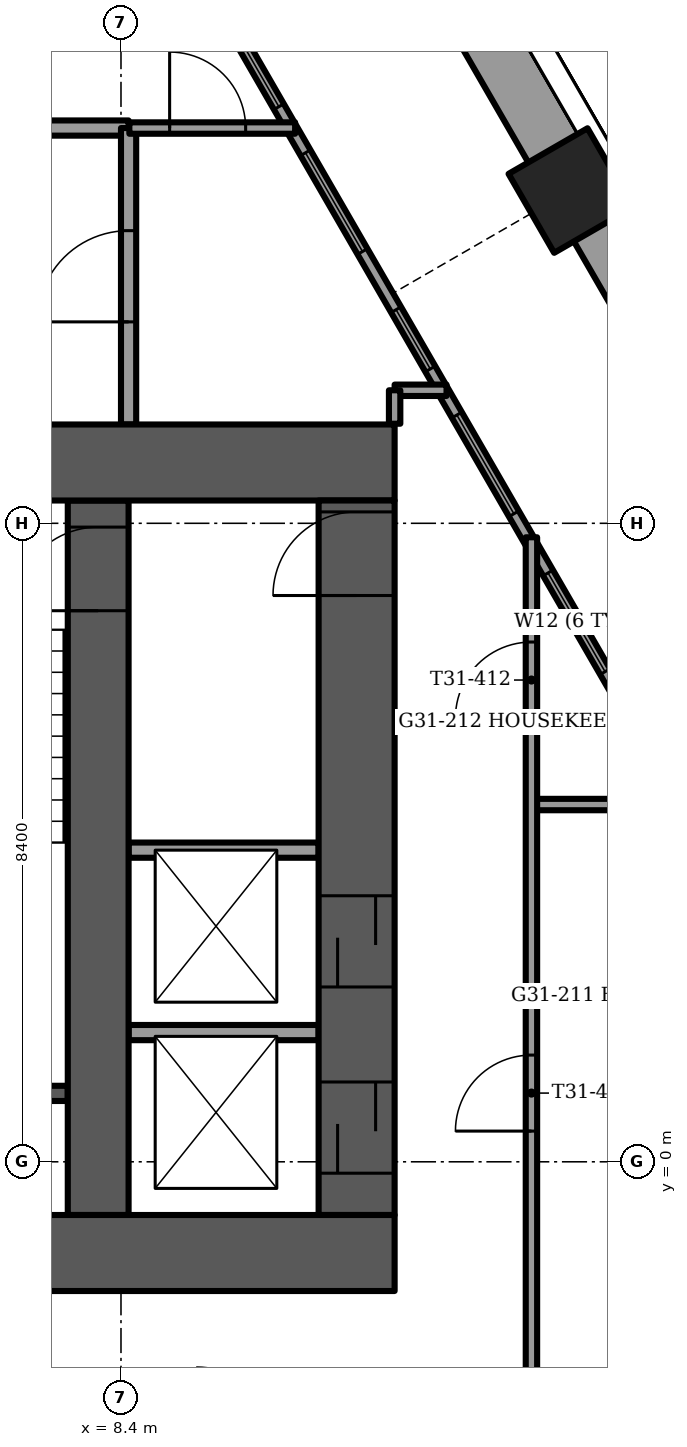
"""IFC4 building model, lengths in metres.
Left out: names, types, materials, properties, quantities, classifications, styles, units other than length and angle.
Written with IfcOpenShell. Run it as: python <this file> out.ifc"""

import sys

from ifc_helpers import new_model, si_unit, direction, frame, frame_2d, origin, origin_2d, place, context, subcontext, project, spatial, rectangle, extrude, element, fill, save


model = new_model("IFC4")
c1 = context("Model", 3, precision=1e-05, world=origin(), true_north=direction((0.0, 1.0)))
c2 = subcontext(c1, "Body", "Model", "MODEL_VIEW")
j1 = project(units=[si_unit("LENGTHUNIT", "METRE"), si_unit("PLANEANGLEUNIT", "RADIAN")], contexts=[c1])
p1 = place(None, origin())
s1 = spatial("IfcSite", under=j1, at=p1, CompositionType="ELEMENT")
p2 = place(p1, origin())
s2 = spatial("IfcBuilding", under=s1, at=p2, CompositionType="ELEMENT")
p3 = place(p2, frame((0.0, 0.0, 127.25)))
s3 = spatial("IfcBuildingStorey", under=s2, at=p3, CompositionType="ELEMENT", Elevation=127.25)
p4 = place(p3, frame((14.318, 12.778, -1.2), z_axis=(0.0, 0.0, 1.0), x_axis=(0.5, -0.866025403784, 0.0)))
e1 = element("IfcColumn", 1, at=p4, inside=s3, PredefinedType="COLUMN", context=c2, shape_type="SweptSolid", body=[
    extrude(rectangle(XDim=1.2, YDim=1.2, at=origin_2d()), origin(), (0.0, 0.0, 1.0), 3.75),
])
p5 = place(p3, frame((-12.0, -1.2, -0.3), z_axis=(0.0, 0.0, 1.0), x_axis=(1.0, 0.0, 0.0)))
e2 = element("IfcWall", 2, at=p5, inside=s3, PredefinedType="SHEAR", context=c2, shape_type="SweptSolid", body=[
    extrude(rectangle(XDim=24.0, YDim=1.0, at=frame_2d((12.0, 0.0))), origin(), (0.0, 0.0, 1.0), 3.75),
])
p6 = place(p5, frame((11.2, 0.0, 0.0)))
e3 = element("IfcOpeningElement", 3, at=p6, cuts=e2, PredefinedType="OPENING", context=c2, shape_type="SweptSolid", body=[
    extrude(rectangle(XDim=1.6, YDim=2.1, at=frame_2d((0.8, 1.05))), frame((0.0, 0.5, 0.0), z_axis=(0.0, -1.0, 0.0), x_axis=(1.0, 0.0, 0.0)), (0.0, 0.0, 1.0), 1.0),
])
p7 = place(p3, frame((-12.0, 9.2, -0.3), z_axis=(0.0, 0.0, 1.0), x_axis=(1.0, 0.0, 0.0)))
e4 = element("IfcWall", 4, at=p7, inside=s3, PredefinedType="SHEAR", context=c2, shape_type="SweptSolid", body=[
    extrude(rectangle(XDim=24.0, YDim=1.0, at=frame_2d((12.0, 0.0))), origin(), (0.0, 0.0, 1.0), 3.75),
])
p8 = place(p7, frame((11.2, 0.0, 0.0)))
e5 = element("IfcOpeningElement", 5, at=p8, cuts=e4, PredefinedType="OPENING", context=c2, shape_type="SweptSolid", body=[
    extrude(rectangle(XDim=1.6, YDim=2.1, at=frame_2d((0.8, 1.05))), frame((0.0, 0.5, 0.0), z_axis=(0.0, -1.0, 0.0), x_axis=(1.0, 0.0, 0.0)), (0.0, 0.0, 1.0), 1.0),
])
p9 = place(p7, frame((5.25, 0.0, 0.0)))
e6 = element("IfcOpeningElement", 6, at=p9, cuts=e4, PredefinedType="OPENING", context=c2, shape_type="SweptSolid", body=[
    extrude(rectangle(XDim=1.1, YDim=2.1, at=frame_2d((0.55, 1.05))), frame((0.0, 0.5, 0.0), z_axis=(0.0, -1.0, 0.0), x_axis=(1.0, 0.0, 0.0)), (0.0, 0.0, 1.0), 1.0),
])
p10 = place(p7, frame((17.65, 0.0, 0.0)))
e7 = element("IfcOpeningElement", 7, at=p10, cuts=e4, PredefinedType="OPENING", context=c2, shape_type="SweptSolid", body=[
    extrude(rectangle(XDim=1.1, YDim=2.1, at=frame_2d((0.55, 1.05))), frame((0.0, 0.5, 0.0), z_axis=(0.0, -1.0, 0.0), x_axis=(1.0, 0.0, 0.0)), (0.0, 0.0, 1.0), 1.0),
])
p11 = place(p3, frame((8.1, -0.7, -0.3), z_axis=(0.0, 0.0, 1.0), x_axis=(0.0, 1.0, 0.0)))
e8 = element("IfcWall", 8, at=p11, inside=s3, PredefinedType="SHEAR", context=c2, shape_type="SweptSolid", body=[
    extrude(rectangle(XDim=9.4, YDim=0.8, at=frame_2d((4.7, 0.0))), origin(), (0.0, 0.0, 1.0), 3.75),
])
p12 = place(p11, frame((7.95, 0.0, 0.0)))
e9 = element("IfcOpeningElement", 9, at=p12, cuts=e8, PredefinedType="OPENING", context=c2, shape_type="SweptSolid", body=[
    extrude(rectangle(XDim=1.1, YDim=2.1, at=frame_2d((0.55, 1.05))), frame((0.0, 0.4, 0.0), z_axis=(0.0, -1.0, 0.0), x_axis=(1.0, 0.0, 0.0)), (0.0, 0.0, 1.0), 0.8),
])
p13 = place(p3, frame((11.5, -0.7, -0.3), z_axis=(0.0, 0.0, 1.0), x_axis=(0.0, 1.0, 0.0)))
e10 = element("IfcWall", 10, at=p13, inside=s3, PredefinedType="SHEAR", context=c2, shape_type="SweptSolid", body=[
    extrude(rectangle(XDim=9.4, YDim=1.0, at=frame_2d((4.7, 0.0))), origin(), (0.0, 0.0, 1.0), 3.75),
])
p14 = place(p13, frame((8.15, 0.0, 0.0)))
e11 = element("IfcOpeningElement", 11, at=p14, cuts=e10, PredefinedType="OPENING", context=c2, shape_type="SweptSolid", body=[
    extrude(rectangle(XDim=1.1, YDim=2.1, at=frame_2d((0.55, 1.05))), frame((0.0, 0.5, 0.0), z_axis=(0.0, -1.0, 0.0), x_axis=(1.0, 0.0, 0.0)), (0.0, 0.0, 1.0), 1.0),
])
p15 = place(p13, frame((0.55, 0.0, 0.0)))
e12 = element("IfcOpeningElement", 12, at=p15, cuts=e10, PredefinedType="OPENING", context=c2, shape_type="SweptSolid", body=[
    extrude(rectangle(XDim=1.2, YDim=2.1, at=frame_2d((0.6, 1.05))), frame((0.0, 0.5, 0.0), z_axis=(0.0, -1.0, 0.0), x_axis=(1.0, 0.0, 0.0)), (0.0, 0.0, 1.0), 1.0),
])
p16 = place(p13, frame((3.0, 0.0, 0.0)))
e13 = element("IfcOpeningElement", 13, at=p16, cuts=e10, PredefinedType="OPENING", context=c2, shape_type="SweptSolid", body=[
    extrude(rectangle(XDim=1.2, YDim=2.1, at=frame_2d((0.6, 1.05))), frame((0.0, 0.5, 0.0), z_axis=(0.0, -1.0, 0.0), x_axis=(1.0, 0.0, 0.0)), (0.0, 0.0, 1.0), 1.0),
])
p17 = place(p3, frame((18.07, 6.58, 0.0), z_axis=(0.0, 0.0, 1.0), x_axis=(-0.499999023957, 0.866025967302, 0.0)))
e14 = element("IfcWall", 14, at=p17, inside=s3, PredefinedType="PARAPET", context=c2, shape_type="SweptSolid", body=[
    extrude(rectangle(XDim=6.673, YDim=0.9, at=frame_2d((3.337, 0.0))), origin(), (0.0, 0.0, 1.0), 1.1),
])
p18 = place(p3, frame((14.163, 13.346, 0.0), z_axis=(0.0, 0.0, 1.0), x_axis=(-0.500001814021, 0.866024356456, 0.0)))
e15 = element("IfcWall", 15, at=p18, inside=s3, PredefinedType="PARAPET", context=c2, shape_type="SweptSolid", body=[
    extrude(rectangle(XDim=6.859, YDim=0.9, at=frame_2d((3.429, 0.0))), origin(), (0.0, 0.0, 1.0), 1.1),
])
p19 = place(p3, frame((10.605, -15.481, 0.0), z_axis=(0.0, 0.0, 1.0), x_axis=(0.500010582961, 0.866019293623, 0.0)))
e16 = element("IfcWall", 16, at=p19, inside=s3, PredefinedType="SOLIDWALL", context=c2, shape_type="SweptSolid", body=[
    extrude(rectangle(XDim=16.21, YDim=0.15, at=frame_2d((8.105, 0.0))), origin(), (0.0, 0.0, 1.0), 3.45),
])
p20 = place(p19, frame((2.105, 0.0, 0.15)))
e17 = element("IfcOpeningElement", 17, at=p20, cuts=e16, PredefinedType="OPENING", context=c2, shape_type="SweptSolid", body=[
    extrude(rectangle(XDim=1.7, YDim=2.85, at=frame_2d((0.85, 1.425))), frame((0.0, 0.075, 0.0), z_axis=(0.0, -1.0, 0.0), x_axis=(1.0, 0.0, 0.0)), (0.0, 0.0, 1.0), 0.15),
])
p21 = place(p19, frame((4.205, 0.0, 0.0)))
e18 = element("IfcOpeningElement", 18, at=p21, cuts=e16, PredefinedType="OPENING", context=c2, shape_type="SweptSolid", body=[
    extrude(rectangle(XDim=1.5, YDim=2.4, at=frame_2d((0.75, 1.2))), frame((0.0, 0.075, 0.0), z_axis=(0.0, -1.0, 0.0), x_axis=(1.0, 0.0, 0.0)), (0.0, 0.0, 1.0), 0.15),
])
p22 = place(p19, frame((6.305, 0.0, 0.15)))
e19 = element("IfcOpeningElement", 19, at=p22, cuts=e16, PredefinedType="OPENING", context=c2, shape_type="SweptSolid", body=[
    extrude(rectangle(XDim=1.7, YDim=2.85, at=frame_2d((0.85, 1.425))), frame((0.0, 0.075, 0.0), z_axis=(0.0, -1.0, 0.0), x_axis=(1.0, 0.0, 0.0)), (0.0, 0.0, 1.0), 0.15),
])
p23 = place(p19, frame((8.228, 0.0, 0.0)))
e20 = element("IfcOpeningElement", 20, at=p23, cuts=e16, PredefinedType="OPENING", context=c2, shape_type="SweptSolid", body=[
    extrude(rectangle(XDim=1.5, YDim=2.4, at=frame_2d((0.75, 1.2))), frame((0.0, 0.075, 0.0), z_axis=(0.0, -1.0, 0.0), x_axis=(1.0, 0.0, 0.0)), (0.0, 0.0, 1.0), 0.15),
])
p24 = place(p19, frame((11.78, 0.0, 0.15)))
e21 = element("IfcOpeningElement", 21, at=p24, cuts=e16, PredefinedType="OPENING", context=c2, shape_type="SweptSolid", body=[
    extrude(rectangle(XDim=1.5, YDim=2.85, at=frame_2d((0.75, 1.425))), frame((0.0, 0.075, 0.0), z_axis=(0.0, -1.0, 0.0), x_axis=(1.0, 0.0, 0.0)), (0.0, 0.0, 1.0), 0.15),
])
p25 = place(p19, frame((0.402, 0.0, 0.15)))
e22 = element("IfcOpeningElement", 22, at=p25, cuts=e16, PredefinedType="OPENING", context=c2, shape_type="SweptSolid", body=[
    extrude(rectangle(XDim=0.9, YDim=2.73, at=frame_2d((0.45, 1.365))), frame((0.0, 0.075, 0.0), z_axis=(0.0, -1.0, 0.0), x_axis=(1.0, 0.0, 0.0)), (0.0, 0.0, 1.0), 0.15),
])
p26 = place(p19, frame((14.907, 0.0, 0.15)))
e23 = element("IfcOpeningElement", 23, at=p26, cuts=e16, PredefinedType="OPENING", context=c2, shape_type="SweptSolid", body=[
    extrude(rectangle(XDim=0.9, YDim=2.73, at=frame_2d((0.45, 1.365))), frame((0.0, 0.075, 0.0), z_axis=(0.0, -1.0, 0.0), x_axis=(1.0, 0.0, 0.0)), (0.0, 0.0, 1.0), 0.15),
])
p27 = place(p3, frame((18.71, -0.378, 0.0), z_axis=(0.0, 0.0, 1.0), x_axis=(-0.500001219746, 0.866024699562, 0.0)))
e24 = element("IfcWall", 24, at=p27, inside=s3, PredefinedType="SOLIDWALL", context=c2, shape_type="SweptSolid", body=[
    extrude(rectangle(XDim=22.137, YDim=0.15, at=frame_2d((11.068, 0.0))), origin(), (0.0, 0.0, 1.0), 3.45),
])
p28 = place(p27, frame((1.583, 0.0, 0.15)))
e25 = element("IfcOpeningElement", 25, at=p28, cuts=e24, PredefinedType="OPENING", context=c2, shape_type="SweptSolid", body=[
    extrude(rectangle(XDim=1.7, YDim=2.85, at=frame_2d((0.85, 1.425))), frame((0.0, 0.075, 0.0), z_axis=(0.0, -1.0, 0.0), x_axis=(1.0, 0.0, 0.0)), (0.0, 0.0, 1.0), 0.15),
])
p29 = place(p27, frame((3.438, 0.0, 0.0)))
e26 = element("IfcOpeningElement", 26, at=p29, cuts=e24, PredefinedType="OPENING", context=c2, shape_type="SweptSolid", body=[
    extrude(rectangle(XDim=1.5, YDim=2.4, at=frame_2d((0.75, 1.2))), frame((0.0, 0.075, 0.0), z_axis=(0.0, -1.0, 0.0), x_axis=(1.0, 0.0, 0.0)), (0.0, 0.0, 1.0), 0.15),
])
p30 = place(p27, frame((6.188, 0.0, 0.15)))
e27 = element("IfcOpeningElement", 27, at=p30, cuts=e24, PredefinedType="OPENING", context=c2, shape_type="SweptSolid", body=[
    extrude(rectangle(XDim=0.9, YDim=2.85, at=frame_2d((0.45, 1.425))), frame((0.0, 0.075, 0.0), z_axis=(0.0, -1.0, 0.0), x_axis=(1.0, 0.0, 0.0)), (0.0, 0.0, 1.0), 0.15),
])
p31 = place(p27, frame((7.883, 0.0, 0.15)))
e28 = element("IfcOpeningElement", 28, at=p31, cuts=e24, PredefinedType="OPENING", context=c2, shape_type="SweptSolid", body=[
    extrude(rectangle(XDim=1.5, YDim=2.85, at=frame_2d((0.75, 1.425))), frame((0.0, 0.075, 0.0), z_axis=(0.0, -1.0, 0.0), x_axis=(1.0, 0.0, 0.0)), (0.0, 0.0, 1.0), 0.15),
])
p32 = place(p27, frame((12.481, 0.0, 0.15)))
e29 = element("IfcOpeningElement", 29, at=p32, cuts=e24, PredefinedType="OPENING", context=c2, shape_type="SweptSolid", body=[
    extrude(rectangle(XDim=0.9, YDim=2.85, at=frame_2d((0.45, 1.425))), frame((0.0, 0.075, 0.0), z_axis=(0.0, -1.0, 0.0), x_axis=(1.0, 0.0, 0.0)), (0.0, 0.0, 1.0), 0.15),
])
p33 = place(p27, frame((10.281, 0.0, 0.15)))
e30 = element("IfcOpeningElement", 30, at=p33, cuts=e24, PredefinedType="OPENING", context=c2, shape_type="SweptSolid", body=[
    extrude(rectangle(XDim=1.5, YDim=2.85, at=frame_2d((0.75, 1.425))), frame((0.0, 0.075, 0.0), z_axis=(0.0, -1.0, 0.0), x_axis=(1.0, 0.0, 0.0)), (0.0, 0.0, 1.0), 0.15),
])
p34 = place(p27, frame((16.465, 0.0, 0.15)))
e31 = element("IfcOpeningElement", 31, at=p34, cuts=e24, PredefinedType="OPENING", context=c2, shape_type="SweptSolid", body=[
    extrude(rectangle(XDim=0.9, YDim=2.85, at=frame_2d((0.45, 1.425))), frame((0.0, 0.075, 0.0), z_axis=(0.0, -1.0, 0.0), x_axis=(1.0, 0.0, 0.0)), (0.0, 0.0, 1.0), 0.15),
])
p35 = place(p27, frame((14.265, 0.0, 0.15)))
e32 = element("IfcOpeningElement", 32, at=p35, cuts=e24, PredefinedType="OPENING", context=c2, shape_type="SweptSolid", body=[
    extrude(rectangle(XDim=1.5, YDim=2.85, at=frame_2d((0.75, 1.425))), frame((0.0, 0.075, 0.0), z_axis=(0.0, -1.0, 0.0), x_axis=(1.0, 0.0, 0.0)), (0.0, 0.0, 1.0), 0.15),
])
p36 = place(p27, frame((19.415, 0.0, 0.15)))
e33 = element("IfcOpeningElement", 33, at=p36, cuts=e24, PredefinedType="OPENING", context=c2, shape_type="SweptSolid", body=[
    extrude(rectangle(XDim=1.7, YDim=2.73, at=frame_2d((0.85, 1.365))), frame((0.0, 0.075, 0.0), z_axis=(0.0, -1.0, 0.0), x_axis=(1.0, 0.0, 0.0)), (0.0, 0.0, 1.0), 0.15),
])
p37 = place(p3, frame((4.45, 0.9, -0.3), z_axis=(0.0, 0.0, 1.0), x_axis=(1.0, 0.0, 0.0)))
e34 = element("IfcWall", 34, at=p37, inside=s3, PredefinedType="SOLIDWALL", context=c2, shape_type="SweptSolid", body=[
    extrude(rectangle(XDim=3.25, YDim=0.2, at=frame_2d((1.625, 0.0))), origin(), (0.0, 0.0, 1.0), 3.75),
])
p38 = place(p3, frame((-8.5, 13.6, 0.0), z_axis=(0.0, 0.0, 1.0), x_axis=(1.0, 0.0, 0.0)))
e35 = element("IfcWall", 35, at=p38, inside=s3, PredefinedType="PARTITIONING", context=c2, shape_type="SweptSolid", body=[
    extrude(rectangle(XDim=17.0, YDim=0.2, at=frame_2d((8.5, 0.0))), origin(), (0.0, 0.0, 1.0), 3.45),
])
p39 = place(p38, frame((8.0, 0.0, 0.0)))
e36 = element("IfcOpeningElement", 36, at=p39, cuts=e35, PredefinedType="OPENING", context=c2, shape_type="SweptSolid", body=[
    extrude(rectangle(XDim=1.0, YDim=2.1, at=frame_2d((0.5, 1.05))), frame((0.0, 0.1, 0.0), z_axis=(0.0, -1.0, 0.0), x_axis=(1.0, 0.0, 0.0)), (0.0, 0.0, 1.0), 0.2),
])
p40 = place(p3, frame((8.5, 9.7, 0.0), z_axis=(0.0, 0.0, 1.0), x_axis=(0.0, 1.0, 0.0)))
e37 = element("IfcWall", 37, at=p40, inside=s3, PredefinedType="PARTITIONING", context=c2, shape_type="SweptSolid", body=[
    extrude(rectangle(XDim=3.9, YDim=0.2, at=frame_2d((1.95, 0.0))), origin(), (0.0, 0.0, 1.0), 3.45),
])
p41 = place(p40, frame((1.35, 0.0, 0.0)))
e38 = element("IfcOpeningElement", 38, at=p41, cuts=e37, PredefinedType="OPENING", context=c2, shape_type="SweptSolid", body=[
    extrude(rectangle(XDim=1.2, YDim=2.1, at=frame_2d((0.6, 1.05))), frame((0.0, 0.1, 0.0), z_axis=(0.0, -1.0, 0.0), x_axis=(1.0, 0.0, 0.0)), (0.0, 0.0, 1.0), 0.2),
])
for number, where, z_axis, x_axis in (
    (39, (8.5, 1.7, 0.0), (0.0, 0.0, 1.0), (1.0, 0.0, 0.0)),
    (40, (8.5, 4.1, 0.0), (0.0, 0.0, 1.0), (1.0, 0.0, 0.0)),
):
    element("IfcWall", number, at=place(p3, frame(where, z_axis=z_axis, x_axis=x_axis)), inside=s3, PredefinedType="PARTITIONING", context=c2, shape_type="SweptSolid", body=[
        extrude(rectangle(XDim=2.5, YDim=0.2, at=frame_2d((1.25, 0.0))), origin(), (0.0, 0.0, 1.0), 3.45),
    ])
p42 = place(p3, frame((13.8, 4.7, 0.0), z_axis=(0.0, 0.0, 1.0), x_axis=(1.0, 0.0, 0.0)))
e41 = element("IfcWall", 41, at=p42, inside=s3, PredefinedType="PARTITIONING", context=c2, shape_type="SweptSolid", body=[
    extrude(rectangle(XDim=2.03, YDim=0.15, at=frame_2d((1.015, 0.0))), origin(), (0.0, 0.0, 1.0), 3.45),
])
p43 = place(p3, frame((12.0, 10.15, 0.0), z_axis=(0.0, 0.0, 1.0), x_axis=(1.0, 0.0, 0.0)))
e42 = element("IfcWall", 42, at=p43, inside=s3, PredefinedType="PARTITIONING", context=c2, shape_type="SweptSolid", body=[
    extrude(rectangle(XDim=0.683, YDim=0.15, at=frame_2d((0.342, 0.0))), origin(), (0.0, 0.0, 1.0), 3.45),
])
p44 = place(p3, frame((8.51, 13.6, 0.0), z_axis=(0.0, 0.0, 1.0), x_axis=(1.0, 0.0, 0.0)))
e43 = element("IfcWall", 43, at=p44, inside=s3, PredefinedType="PARTITIONING", context=c2, shape_type="SweptSolid", body=[
    extrude(rectangle(XDim=2.181, YDim=0.15, at=frame_2d((1.09, 0.0))), origin(), (0.0, 0.0, 1.0), 3.45),
])
p45 = place(p44, frame((0.53, 0.0, 0.0)))
e44 = element("IfcOpeningElement", 44, at=p45, cuts=e43, PredefinedType="OPENING", context=c2, shape_type="SweptSolid", body=[
    extrude(rectangle(XDim=1.0, YDim=2.1, at=frame_2d((0.5, 1.05))), frame((0.0, 0.075, 0.0), z_axis=(0.0, -1.0, 0.0), x_axis=(1.0, 0.0, 0.0)), (0.0, 0.0, 1.0), 0.15),
])
p46 = place(p3, frame((13.8, -3.7, 0.0), z_axis=(0.0, 0.0, 1.0), x_axis=(0.0, 1.0, 0.0)))
e45 = element("IfcWall", 45, at=p46, inside=s3, PredefinedType="PARTITIONING", context=c2, shape_type="SweptSolid", body=[
    extrude(rectangle(XDim=11.916, YDim=0.15, at=frame_2d((5.958, 0.0))), origin(), (0.0, 0.0, 1.0), 3.45),
])
p47 = place(p46, frame((4.104, 0.0, 0.0)))
e46 = element("IfcOpeningElement", 46, at=p47, cuts=e45, PredefinedType="OPENING", context=c2, shape_type="SweptSolid", body=[
    extrude(rectangle(XDim=1.0, YDim=2.1, at=frame_2d((0.5, 1.05))), frame((0.0, 0.075, 0.0), z_axis=(0.0, -1.0, 0.0), x_axis=(1.0, 0.0, 0.0)), (0.0, 0.0, 1.0), 0.15),
])
p48 = place(p46, frame((9.538, 0.0, 0.0)))
e47 = element("IfcOpeningElement", 47, at=p48, cuts=e45, PredefinedType="OPENING", context=c2, shape_type="SweptSolid", body=[
    extrude(rectangle(XDim=1.0, YDim=2.1, at=frame_2d((0.5, 1.05))), frame((0.0, 0.075, 0.0), z_axis=(0.0, -1.0, 0.0), x_axis=(1.0, 0.0, 0.0)), (0.0, 0.0, 1.0), 0.15),
])
p49 = place(p3, frame((12.0, 9.71, 0.0), z_axis=(0.0, 0.0, 1.0), x_axis=(0.0, 1.0, 0.0)))
e48 = element("IfcWall", 48, at=p49, inside=s3, PredefinedType="PARTITIONING", context=c2, shape_type="SweptSolid", body=[
    extrude(rectangle(XDim=0.44, YDim=0.15, at=frame_2d((0.22, 0.0))), origin(), (0.0, 0.0, 1.0), 3.45),
])
p50 = place(p31, origin())
e49 = element("IfcWindow", 49, at=p50, inside=s3, PartitioningType="SINGLE_PANEL", PredefinedType="WINDOW", context=c2, shape_type="SweptSolid", body=[
    extrude(rectangle(XDim=1.5, YDim=2.85, at=frame_2d((0.75, 1.425))), frame((0.0, 0.03, 0.0), z_axis=(0.0, -1.0, 0.0), x_axis=(1.0, 0.0, 0.0)), (0.0, 0.0, 1.0), 0.06),
])
fill(e28, e49)
p51 = place(p32, origin())
e50 = element("IfcWindow", 50, at=p51, inside=s3, PartitioningType="SINGLE_PANEL", PredefinedType="WINDOW", context=c2, shape_type="SweptSolid", body=[
    extrude(rectangle(XDim=0.9, YDim=2.85, at=frame_2d((0.45, 1.425))), frame((0.0, 0.03, 0.0), z_axis=(0.0, -1.0, 0.0), x_axis=(1.0, 0.0, 0.0)), (0.0, 0.0, 1.0), 0.06),
])
fill(e29, e50)
p52 = place(p33, origin())
e51 = element("IfcWindow", 51, at=p52, inside=s3, PartitioningType="SINGLE_PANEL", PredefinedType="WINDOW", context=c2, shape_type="SweptSolid", body=[
    extrude(rectangle(XDim=1.5, YDim=2.85, at=frame_2d((0.75, 1.425))), frame((0.0, 0.03, 0.0), z_axis=(0.0, -1.0, 0.0), x_axis=(1.0, 0.0, 0.0)), (0.0, 0.0, 1.0), 0.06),
])
fill(e30, e51)
p53 = place(p34, origin())
e52 = element("IfcWindow", 52, at=p53, inside=s3, PartitioningType="SINGLE_PANEL", PredefinedType="WINDOW", context=c2, shape_type="SweptSolid", body=[
    extrude(rectangle(XDim=0.9, YDim=2.85, at=frame_2d((0.45, 1.425))), frame((0.0, 0.03, 0.0), z_axis=(0.0, -1.0, 0.0), x_axis=(1.0, 0.0, 0.0)), (0.0, 0.0, 1.0), 0.06),
])
fill(e31, e52)
p54 = place(p35, origin())
e53 = element("IfcWindow", 53, at=p54, inside=s3, PartitioningType="SINGLE_PANEL", PredefinedType="WINDOW", context=c2, shape_type="SweptSolid", body=[
    extrude(rectangle(XDim=1.5, YDim=2.85, at=frame_2d((0.75, 1.425))), frame((0.0, 0.03, 0.0), z_axis=(0.0, -1.0, 0.0), x_axis=(1.0, 0.0, 0.0)), (0.0, 0.0, 1.0), 0.06),
])
fill(e32, e53)
p55 = place(p12, origin())
e54 = element("IfcDoor", 54, at=p55, inside=s3, OperationType="SINGLE_SWING_LEFT", PredefinedType="DOOR", context=c2, shape_type="SweptSolid", body=[
    extrude(rectangle(XDim=1.1, YDim=2.1, at=frame_2d((0.55, 1.05))), frame((0.0, 0.025, 0.0), z_axis=(0.0, -1.0, 0.0), x_axis=(1.0, 0.0, 0.0)), (0.0, 0.0, 1.0), 0.05),
])
fill(e9, e54)
p56 = place(p41, origin())
e55 = element("IfcDoor", 55, at=p56, inside=s3, OperationType="SINGLE_SWING_LEFT", PredefinedType="DOOR", context=c2, shape_type="SweptSolid", body=[
    extrude(rectangle(XDim=1.2, YDim=2.1, at=frame_2d((0.6, 1.05))), frame((0.0, 0.025, 0.0), z_axis=(0.0, -1.0, 0.0), x_axis=(1.0, 0.0, 0.0)), (0.0, 0.0, 1.0), 0.05),
])
fill(e38, e55)
p57 = place(p14, origin())
e56 = element("IfcDoor", 56, at=p57, inside=s3, OperationType="SINGLE_SWING_RIGHT", PredefinedType="DOOR", context=c2, shape_type="SweptSolid", body=[
    extrude(rectangle(XDim=1.1, YDim=2.1, at=frame_2d((0.55, 1.05))), frame((0.0, 0.025, 0.0), z_axis=(0.0, -1.0, 0.0), x_axis=(1.0, 0.0, 0.0)), (0.0, 0.0, 1.0), 0.05),
])
fill(e11, e56)
p58 = place(p15, origin())
e57 = element("IfcDoor", 57, at=p58, inside=s3, OperationType="SLIDING_TO_LEFT", PredefinedType="DOOR", context=c2, shape_type="SweptSolid", body=[
    extrude(rectangle(XDim=1.2, YDim=2.1, at=frame_2d((0.6, 1.05))), frame((0.0, 0.025, 0.0), z_axis=(0.0, -1.0, 0.0), x_axis=(1.0, 0.0, 0.0)), (0.0, 0.0, 1.0), 0.05),
])
fill(e12, e57)
p59 = place(p16, origin())
e58 = element("IfcDoor", 58, at=p59, inside=s3, OperationType="SLIDING_TO_LEFT", PredefinedType="DOOR", context=c2, shape_type="SweptSolid", body=[
    extrude(rectangle(XDim=1.2, YDim=2.1, at=frame_2d((0.6, 1.05))), frame((0.0, 0.025, 0.0), z_axis=(0.0, -1.0, 0.0), x_axis=(1.0, 0.0, 0.0)), (0.0, 0.0, 1.0), 0.05),
])
fill(e13, e58)
p60 = place(p47, origin())
e59 = element("IfcDoor", 59, at=p60, inside=s3, OperationType="SINGLE_SWING_RIGHT", PredefinedType="DOOR", context=c2, shape_type="SweptSolid", body=[
    extrude(rectangle(XDim=1.0, YDim=2.1, at=frame_2d((0.5, 1.05))), frame((0.0, 0.025, 0.0), z_axis=(0.0, -1.0, 0.0), x_axis=(1.0, 0.0, 0.0)), (0.0, 0.0, 1.0), 0.05),
])
fill(e46, e59)
p61 = place(p48, origin())
e60 = element("IfcDoor", 60, at=p61, inside=s3, OperationType="SINGLE_SWING_LEFT", PredefinedType="DOOR", context=c2, shape_type="SweptSolid", body=[
    extrude(rectangle(XDim=1.0, YDim=2.1, at=frame_2d((0.5, 1.05))), frame((0.0, 0.025, 0.0), z_axis=(0.0, -1.0, 0.0), x_axis=(1.0, 0.0, 0.0)), (0.0, 0.0, 1.0), 0.05),
])
fill(e47, e60)
p62 = place(p45, origin())
e61 = element("IfcDoor", 61, at=p62, inside=s3, OperationType="SINGLE_SWING_LEFT", PredefinedType="DOOR", context=c2, shape_type="SweptSolid", body=[
    extrude(rectangle(XDim=1.0, YDim=2.1, at=frame_2d((0.5, 1.05))), frame((0.0, 0.025, 0.0), z_axis=(0.0, -1.0, 0.0), x_axis=(1.0, 0.0, 0.0)), (0.0, 0.0, 1.0), 0.05),
])
fill(e44, e61)
save(model, sys.argv[1])
